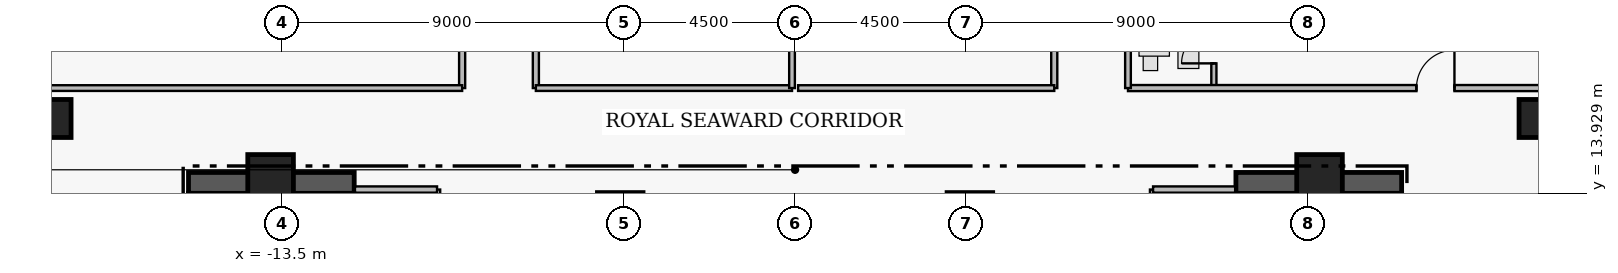
"""IFC4 building model, lengths in metres.
Left out: names, types, materials, properties, quantities, classifications, styles, units other than length and angle.
Written with IfcOpenShell. Run it as: python <this file> out.ifc"""

import sys

from ifc_helpers import new_model, si_unit, direction, frame, frame_2d, origin, origin_2d, place, context, subcontext, project, spatial, rectangle, extrude, element, fill, save


model = new_model("IFC4")
c1 = context("Model", 3, precision=1e-05, world=origin(), true_north=direction((0.0, 1.0)))
c2 = subcontext(c1, "Body", "Model", "MODEL_VIEW")
j1 = project(units=[si_unit("LENGTHUNIT", "METRE"), si_unit("PLANEANGLEUNIT", "RADIAN")], contexts=[c1])
p1 = place(None, origin())
s1 = spatial("IfcSite", under=j1, at=p1, CompositionType="ELEMENT")
p2 = place(p1, origin())
s2 = spatial("IfcBuilding", under=s1, at=p2, CompositionType="ELEMENT")
p3 = place(p2, frame((0.0, 0.0, 265.55)))
s3 = spatial("IfcBuildingStorey", under=s2, at=p3, CompositionType="ELEMENT", Elevation=265.55)
for number, where, z_axis, x_axis in (
    (1, (-15.96, 14.205, 0.0), (0.0, 0.0, 1.0), (1.0, 0.0, 0.0)),
    (2, (11.6, 14.205, 0.0), (0.0, 0.0, 1.0), (1.0, 0.0, 0.0)),
):
    element("IfcWall", number, at=place(p3, frame(where, z_axis=z_axis, x_axis=x_axis)), inside=s3, PredefinedType="SHEAR", context=c2, shape_type="SweptSolid", body=[
        extrude(rectangle(XDim=4.36, YDim=0.55, at=frame_2d((2.18, 0.0))), origin(), (0.0, 0.0, 1.0), 3.51),
    ])
for number, where, z_axis, x_axis in (
    (3, (-13.8, 14.35, 0.0), (0.0, 0.0, 1.0), (1.0, 0.0, 0.0)),
    (4, (-4.6, 13.35, 0.0), (0.0, 0.0, 1.0), (1.0, 0.0, 0.0)),
    (5, (4.6, 13.35, 0.0), (0.0, 0.0, 1.0), (1.0, 0.0, 0.0)),
    (6, (13.8, 14.35, 0.0), (0.0, 0.0, 1.0), (1.0, 0.0, 0.0)),
):
    element("IfcColumn", number, at=place(p3, frame(where, z_axis=z_axis, x_axis=x_axis)), inside=s3, PredefinedType="COLUMN", context=c2, shape_type="SweptSolid", body=[
        extrude(rectangle(XDim=1.2, YDim=1.2, at=origin_2d()), origin(), (0.0, 0.0, 1.0), 3.7),
    ])
for number, where, z_axis, x_axis in (
    (7, (-19.55, 15.9, 0.0), (0.0, 0.0, 1.0), (1.0, 0.0, 0.0)),
    (8, (19.55, 15.9, 0.0), (0.0, 0.0, 1.0), (1.0, 0.0, 0.0)),
):
    element("IfcColumn", number, at=place(p3, frame(where, z_axis=z_axis, x_axis=x_axis)), inside=s3, PredefinedType="COLUMN", context=c2, shape_type="SweptSolid", body=[
        extrude(rectangle(XDim=1.0, YDim=1.0, at=origin_2d()), origin(), (0.0, 0.0, 1.0), 3.7),
    ])
p4 = place(p3, frame((-6.82, 16.7, 0.0), z_axis=(0.0, 0.0, 1.0), x_axis=(0.0, 1.0, 0.0)))
e9 = element("IfcWall", 9, at=p4, inside=s3, PredefinedType="PARTITIONING", context=c2, shape_type="SweptSolid", body=[
    extrude(rectangle(XDim=4.95, YDim=0.16, at=frame_2d((2.475, 0.0))), origin(), (0.0, 0.0, 1.0), 3.48),
])
p5 = place(p4, frame((1.935, 0.0, 0.0)))
e10 = element("IfcOpeningElement", 10, at=p5, cuts=e9, PredefinedType="OPENING", context=c2, shape_type="SweptSolid", body=[
    extrude(rectangle(XDim=1.08, YDim=2.18, at=frame_2d((0.54, 1.09))), frame((0.0, 0.09, 0.0), z_axis=(0.0, -1.0, 0.0), x_axis=(1.0, 0.0, 0.0)), (0.0, 0.0, 1.0), 0.18),
])
p6 = place(p3, frame((6.82, 16.7, 0.0), z_axis=(0.0, 0.0, 1.0), x_axis=(0.0, 1.0, 0.0)))
e11 = element("IfcWall", 11, at=p6, inside=s3, PredefinedType="PARTITIONING", context=c2, shape_type="SweptSolid", body=[
    extrude(rectangle(XDim=4.95, YDim=0.16, at=frame_2d((2.475, 0.0))), origin(), (0.0, 0.0, 1.0), 3.48),
])
p7 = place(p6, frame((1.935, 0.0, 0.0)))
e12 = element("IfcOpeningElement", 12, at=p7, cuts=e11, PredefinedType="OPENING", context=c2, shape_type="SweptSolid", body=[
    extrude(rectangle(XDim=1.08, YDim=2.18, at=frame_2d((0.54, 1.09))), frame((0.0, 0.09, 0.0), z_axis=(0.0, -1.0, 0.0), x_axis=(1.0, 0.0, 0.0)), (0.0, 0.0, 1.0), 0.18),
])
p8 = place(p3, frame((-8.76, 16.7, 0.0), z_axis=(0.0, 0.0, 1.0), x_axis=(0.0, 1.0, 0.0)))
e13 = element("IfcWall", 13, at=p8, inside=s3, PredefinedType="PARTITIONING", context=c2, shape_type="SweptSolid", body=[
    extrude(rectangle(XDim=4.6, YDim=0.16, at=frame_2d((2.3, 0.0))), origin(), (0.0, 0.0, 1.0), 3.48),
])
p9 = place(p8, frame((1.84, 0.0, 0.0)))
e14 = element("IfcOpeningElement", 14, at=p9, cuts=e13, PredefinedType="OPENING", context=c2, shape_type="SweptSolid", body=[
    extrude(rectangle(XDim=0.92, YDim=2.12, at=frame_2d((0.46, 1.06))), frame((0.0, 0.09, 0.0), z_axis=(0.0, -1.0, 0.0), x_axis=(1.0, 0.0, 0.0)), (0.0, 0.0, 1.0), 0.18),
])
p10 = place(p3, frame((11.02, 16.7, 0.0), z_axis=(0.0, 0.0, 1.0), x_axis=(0.0, 1.0, 0.0)))
e15 = element("IfcWall", 15, at=p10, inside=s3, PredefinedType="PLUMBINGWALL", context=c2, shape_type="SweptSolid", body=[
    extrude(rectangle(XDim=2.36, YDim=0.135, at=frame_2d((1.18, 0.0))), origin(), (0.0, 0.0, 1.0), 3.48),
])
p11 = place(p10, frame((0.65, 0.0, 0.0)))
e16 = element("IfcOpeningElement", 16, at=p11, cuts=e15, PredefinedType="OPENING", context=c2, shape_type="SweptSolid", body=[
    extrude(rectangle(XDim=0.85, YDim=2.1, at=frame_2d((0.425, 1.05))), frame((0.0, 0.077, 0.0), z_axis=(0.0, -1.0, 0.0), x_axis=(1.0, 0.0, 0.0)), (0.0, 0.0, 1.0), 0.155),
])
p12 = place(p3, frame((8.76, 16.7, 0.0), z_axis=(0.0, 0.0, 1.0), x_axis=(1.0, 0.0, 0.0)))
e17 = element("IfcWall", 17, at=p12, inside=s3, PredefinedType="PARTITIONING", context=c2, shape_type="SweptSolid", body=[
    extrude(rectangle(XDim=13.88, YDim=0.16, at=frame_2d((6.94, 0.0))), origin(), (0.0, 0.0, 1.0), 3.076),
])
p13 = place(p12, frame((7.59, 0.0, 0.0)))
e18 = element("IfcOpeningElement", 18, at=p13, cuts=e17, PredefinedType="OPENING", context=c2, shape_type="SweptSolid", body=[
    extrude(rectangle(XDim=1.0, YDim=2.15, at=frame_2d((0.5, 1.075))), frame((0.0, 0.09, 0.0), z_axis=(0.0, -1.0, 0.0), x_axis=(1.0, 0.0, 0.0)), (0.0, 0.0, 1.0), 0.18),
])
p14 = place(p3, frame((-9.42, 11.07, 0.0), z_axis=(0.0, 0.0, 1.0), x_axis=(0.0, 1.0, 0.0)))
e19 = element("IfcWall", 19, at=p14, inside=s3, PredefinedType="PARTITIONING", context=c2, shape_type="SweptSolid", body=[
    extrude(rectangle(XDim=2.96, YDim=0.165, at=frame_2d((1.48, 0.0))), origin(), (0.0, 0.0, 1.0), 3.48),
])
p15 = place(p3, frame((-11.58, 14.03, 0.0), z_axis=(0.0, 0.0, 1.0), x_axis=(1.0, 0.0, 0.0)))
e20 = element("IfcWall", 20, at=p15, inside=s3, PredefinedType="PARTITIONING", context=c2, shape_type="SweptSolid", body=[
    extrude(rectangle(XDim=2.16, YDim=0.165, at=frame_2d((1.08, 0.0))), origin(), (0.0, 0.0, 1.0), 3.48),
])
p16 = place(p3, frame((9.42, 11.07, 0.0), z_axis=(0.0, 0.0, 1.0), x_axis=(0.0, 1.0, 0.0)))
e21 = element("IfcWall", 21, at=p16, inside=s3, PredefinedType="PARTITIONING", context=c2, shape_type="SweptSolid", body=[
    extrude(rectangle(XDim=2.96, YDim=0.165, at=frame_2d((1.48, 0.0))), origin(), (0.0, 0.0, 1.0), 3.48),
])
p17 = place(p3, frame((9.42, 14.03, 0.0), z_axis=(0.0, 0.0, 1.0), x_axis=(1.0, 0.0, 0.0)))
e22 = element("IfcWall", 22, at=p17, inside=s3, PredefinedType="PARTITIONING", context=c2, shape_type="SweptSolid", body=[
    extrude(rectangle(XDim=2.16, YDim=0.165, at=frame_2d((1.08, 0.0))), origin(), (0.0, 0.0, 1.0), 3.48),
])
p18 = place(p3, frame((-6.82, 16.7, 0.0), z_axis=(0.0, 0.0, 1.0), x_axis=(1.0, 0.0, 0.0)))
e23 = element("IfcWall", 23, at=p18, inside=s3, PredefinedType="PARTITIONING", context=c2, shape_type="SweptSolid", body=[
    extrude(rectangle(XDim=6.74, YDim=0.15, at=frame_2d((3.37, 0.0))), origin(), (0.0, 0.0, 1.0), 3.076),
])
p19 = place(p3, frame((-0.08, 16.7, 0.0), z_axis=(0.0, 0.0, 1.0), x_axis=(0.0, 1.0, 0.0)))
e24 = element("IfcWall", 24, at=p19, inside=s3, PredefinedType="PARTITIONING", context=c2, shape_type="SweptSolid", body=[
    extrude(rectangle(XDim=4.95, YDim=0.15, at=frame_2d((2.475, 0.0))), origin(), (0.0, 0.0, 1.0), 3.48),
])
p20 = place(p3, frame((0.08, 16.7, 0.0), z_axis=(0.0, 0.0, 1.0), x_axis=(1.0, 0.0, 0.0)))
e25 = element("IfcWall", 25, at=p20, inside=s3, PredefinedType="PARTITIONING", context=c2, shape_type="SweptSolid", body=[
    extrude(rectangle(XDim=6.74, YDim=0.15, at=frame_2d((3.37, 0.0))), origin(), (0.0, 0.0, 1.0), 3.076),
])
p21 = place(p3, frame((-21.118, 16.7, 0.0), z_axis=(0.0, 0.0, 1.0), x_axis=(1.0, 0.0, 0.0)))
e26 = element("IfcWall", 26, at=p21, inside=s3, PredefinedType="PARTITIONING", context=c2, shape_type="SweptSolid", body=[
    extrude(rectangle(XDim=12.358, YDim=0.15, at=frame_2d((6.179, 0.0))), origin(), (0.0, 0.0, 1.0), 3.076),
])
p22 = place(p3, frame((8.76, 16.7, 0.0), z_axis=(0.0, 0.0, 1.0), x_axis=(0.0, 1.0, 0.0)))
e27 = element("IfcWall", 27, at=p22, inside=s3, PredefinedType="PARTITIONING", context=c2, shape_type="SweptSolid", body=[
    extrude(rectangle(XDim=12.68, YDim=0.15, at=frame_2d((6.34, 0.0))), origin(), (0.0, 0.0, 1.0), 3.48),
])
p23 = place(p11, origin())
e28 = element("IfcDoor", 28, at=p23, inside=s3, OperationType="SINGLE_SWING_LEFT", PredefinedType="DOOR", context=c2, shape_type="SweptSolid", body=[
    extrude(rectangle(XDim=0.85, YDim=2.1, at=frame_2d((0.425, 1.05))), frame((0.0, 0.025, 0.0), z_axis=(0.0, -1.0, 0.0), x_axis=(1.0, 0.0, 0.0)), (0.0, 0.0, 1.0), 0.05),
])
fill(e16, e28)
p24 = place(p13, origin())
e29 = element("IfcDoor", 29, at=p24, inside=s3, OperationType="SINGLE_SWING_RIGHT", PredefinedType="DOOR", context=c2, shape_type="SweptSolid", body=[
    extrude(rectangle(XDim=1.0, YDim=2.15, at=frame_2d((0.5, 1.075))), frame((0.0, 0.025, 0.0), z_axis=(0.0, -1.0, 0.0), x_axis=(1.0, 0.0, 0.0)), (0.0, 0.0, 1.0), 0.05),
])
fill(e18, e29)
save(model, sys.argv[1])
